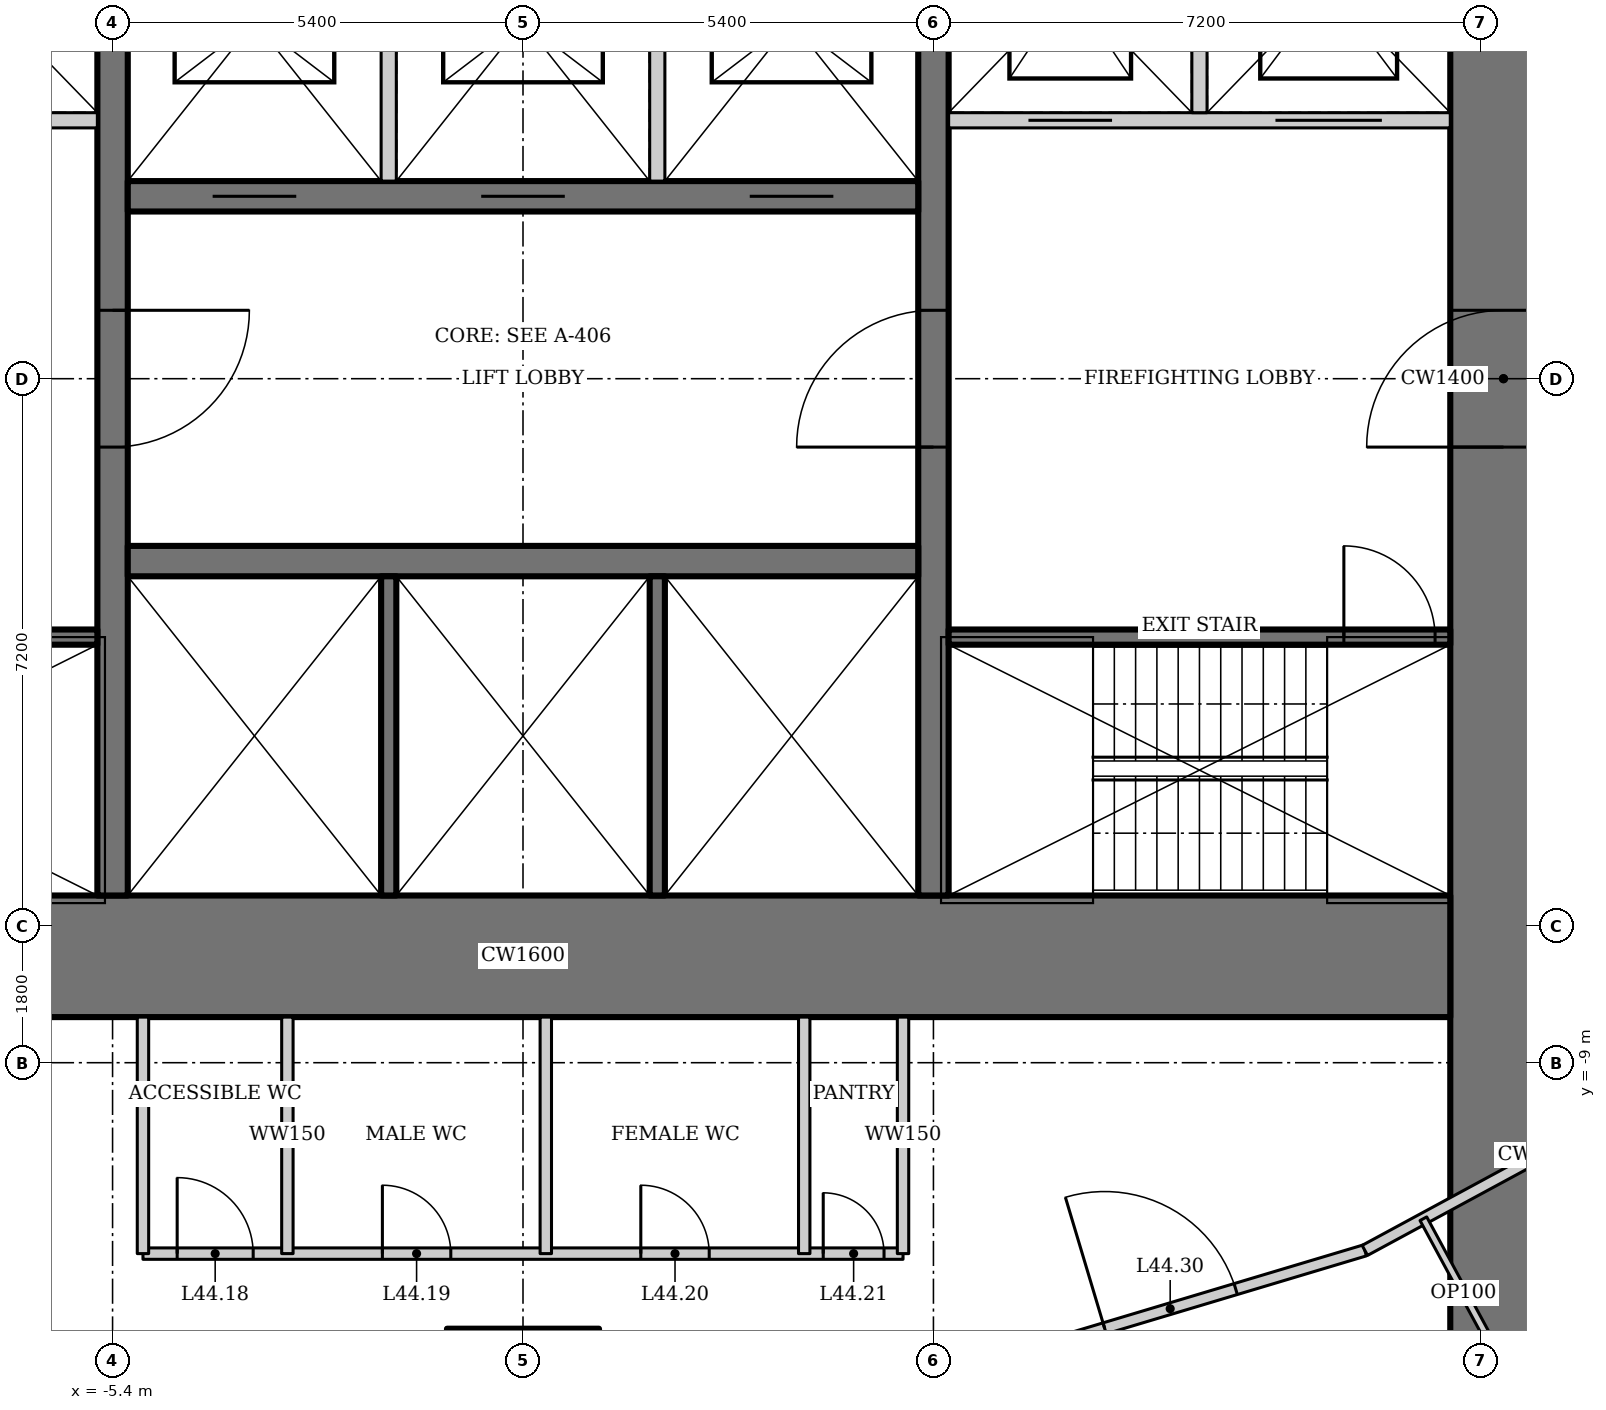
"""IFC4 building model, lengths in metres.
Left out: names, types, materials, properties, quantities, classifications, styles, units other than length and angle.
Written with IfcOpenShell. Run it as: python <this file> out.ifc"""

import sys

from ifc_helpers import new_model, si_unit, direction, frame, frame_2d, origin, origin_2d, place, context, subcontext, project, spatial, rectangle, hollow_rectangle, extrude, element, fill, save


model = new_model("IFC4")
c1 = context("Model", 3, precision=1e-05, world=origin(), true_north=direction((0.0, 1.0)))
c2 = subcontext(c1, "Body", "Model", "MODEL_VIEW")
j1 = project(units=[si_unit("LENGTHUNIT", "METRE"), si_unit("PLANEANGLEUNIT", "RADIAN")], contexts=[c1])
p1 = place(None, origin())
s1 = spatial("IfcSite", under=j1, at=p1, CompositionType="ELEMENT")
p2 = place(p1, origin())
s2 = spatial("IfcBuilding", under=s1, at=p2, CompositionType="ELEMENT")
p3 = place(p2, frame((0.0, 0.0, 188.8)))
s3 = spatial("IfcBuildingStorey", under=s2, at=p3, CompositionType="ELEMENT", Elevation=188.8)
p4 = place(p3, frame((0.0, -13.5, 0.0), z_axis=(0.0, 0.0, 1.0), x_axis=(1.0, 0.0, 0.0)))
e1 = element("IfcColumn", 1, at=p4, inside=s3, PredefinedType="COLUMN", context=c2, shape_type="SweptSolid", body=[
    extrude(hollow_rectangle(XDim=2.0, YDim=2.0, WallThickness=0.17, at=origin_2d()), origin(), (0.0, 0.0, 1.0), 4.2),
])
p5 = place(p3, frame((12.9, -13.0, 0.0), z_axis=(0.0, 0.0, 1.0), x_axis=(0.0, 1.0, 0.0)))
e2 = element("IfcWall", 2, at=p5, inside=s3, PredefinedType="SHEAR", context=c2, shape_type="SweptSolid", body=[
    extrude(rectangle(XDim=26.0, YDim=1.4, at=frame_2d((13.0, 0.0))), origin(), (0.0, 0.0, 1.0), 4.2),
])
p6 = place(p5, frame((12.1, 0.0, 0.0)))
e3 = element("IfcOpeningElement", 3, at=p6, cuts=e2, PredefinedType="OPENING", context=c2, shape_type="SweptSolid", body=[
    extrude(rectangle(XDim=1.8, YDim=2.1, at=frame_2d((0.9, 1.05))), frame((0.0, 0.71, 0.0), z_axis=(0.0, -1.0, 0.0), x_axis=(1.0, 0.0, 0.0)), (0.0, 0.0, 1.0), 1.42),
])
p7 = place(p3, frame((-12.2, -7.6, 0.0), z_axis=(0.0, 0.0, 1.0), x_axis=(1.0, 0.0, 0.0)))
e4 = element("IfcWall", 4, at=p7, inside=s3, PredefinedType="SHEAR", context=c2, shape_type="SweptSolid", body=[
    extrude(rectangle(XDim=24.4, YDim=1.6, at=frame_2d((12.2, 0.0))), origin(), (0.0, 0.0, 1.0), 4.2),
])
p8 = place(p3, frame((5.4, -6.8, 0.0), z_axis=(0.0, 0.0, 1.0), x_axis=(0.0, 1.0, 0.0)))
e5 = element("IfcWall", 5, at=p8, inside=s3, PredefinedType="SHEAR", context=c2, shape_type="SweptSolid", body=[
    extrude(rectangle(XDim=13.6, YDim=0.4, at=frame_2d((6.8, 0.0))), origin(), (0.0, 0.0, 1.0), 4.2),
])
p9 = place(p8, frame((5.9, 0.0, 0.0)))
e6 = element("IfcOpeningElement", 6, at=p9, cuts=e5, PredefinedType="OPENING", context=c2, shape_type="SweptSolid", body=[
    extrude(rectangle(XDim=1.8, YDim=2.1, at=frame_2d((0.9, 1.05))), frame((0.0, 0.21, 0.0), z_axis=(0.0, -1.0, 0.0), x_axis=(1.0, 0.0, 0.0)), (0.0, 0.0, 1.0), 0.42),
])
p10 = place(p3, frame((-5.4, 6.8, 0.0), z_axis=(0.0, 0.0, 1.0), x_axis=(0.0, -1.0, 0.0)))
e7 = element("IfcWall", 7, at=p10, inside=s3, PredefinedType="SHEAR", context=c2, shape_type="SweptSolid", body=[
    extrude(rectangle(XDim=13.6, YDim=0.4, at=frame_2d((6.8, 0.0))), origin(), (0.0, 0.0, 1.0), 4.2),
])
p11 = place(p10, frame((5.9, 0.0, 0.0)))
e8 = element("IfcOpeningElement", 8, at=p11, cuts=e7, PredefinedType="OPENING", context=c2, shape_type="SweptSolid", body=[
    extrude(rectangle(XDim=1.8, YDim=2.1, at=frame_2d((0.9, 1.05))), frame((0.0, 0.21, 0.0), z_axis=(0.0, -1.0, 0.0), x_axis=(1.0, 0.0, 0.0)), (0.0, 0.0, 1.0), 0.42),
])
p12 = place(p3, frame((-5.2, -2.4, 0.0), z_axis=(0.0, 0.0, 1.0), x_axis=(1.0, 0.0, 0.0)))
e9 = element("IfcWall", 9, at=p12, inside=s3, PredefinedType="SHEAR", context=c2, shape_type="SweptSolid", body=[
    extrude(rectangle(XDim=10.4, YDim=0.4, at=frame_2d((5.2, 0.0))), origin(), (0.0, 0.0, 1.0), 4.2),
])
for number, where, z_axis, x_axis in (
    (10, (-1.767, -2.6, 0.0), (0.0, 0.0, 1.0), (0.0, -1.0, 0.0)),
    (11, (1.767, -2.6, 0.0), (0.0, 0.0, 1.0), (0.0, -1.0, 0.0)),
):
    element("IfcWall", number, at=place(p3, frame(where, z_axis=z_axis, x_axis=x_axis)), inside=s3, PredefinedType="SOLIDWALL", context=c2, shape_type="SweptSolid", body=[
        extrude(rectangle(XDim=4.2, YDim=0.2, at=frame_2d((2.1, 0.0))), origin(), (0.0, 0.0, 1.0), 4.2),
    ])
p13 = place(p3, frame((5.2, 2.4, 0.0), z_axis=(0.0, 0.0, 1.0), x_axis=(-1.0, 0.0, 0.0)))
e12 = element("IfcWall", 12, at=p13, inside=s3, PredefinedType="SHEAR", context=c2, shape_type="SweptSolid", body=[
    extrude(rectangle(XDim=10.4, YDim=0.4, at=frame_2d((5.2, 0.0))), origin(), (0.0, 0.0, 1.0), 4.2),
])
p14 = place(p13, frame((8.183, 0.0, 0.0)))
e13 = element("IfcOpeningElement", 13, at=p14, cuts=e12, PredefinedType="OPENING", context=c2, shape_type="SweptSolid", body=[
    extrude(rectangle(XDim=1.1, YDim=2.2, at=frame_2d((0.55, 1.1))), frame((0.0, 0.21, 0.0), z_axis=(0.0, -1.0, 0.0), x_axis=(1.0, 0.0, 0.0)), (0.0, 0.0, 1.0), 0.42),
])
p15 = place(p13, frame((4.65, 0.0, 0.0)))
e14 = element("IfcOpeningElement", 14, at=p15, cuts=e12, PredefinedType="OPENING", context=c2, shape_type="SweptSolid", body=[
    extrude(rectangle(XDim=1.1, YDim=2.2, at=frame_2d((0.55, 1.1))), frame((0.0, 0.21, 0.0), z_axis=(0.0, -1.0, 0.0), x_axis=(1.0, 0.0, 0.0)), (0.0, 0.0, 1.0), 0.42),
])
p16 = place(p13, frame((1.117, 0.0, 0.0)))
e15 = element("IfcOpeningElement", 15, at=p16, cuts=e12, PredefinedType="OPENING", context=c2, shape_type="SweptSolid", body=[
    extrude(rectangle(XDim=1.1, YDim=2.2, at=frame_2d((0.55, 1.1))), frame((0.0, 0.21, 0.0), z_axis=(0.0, -1.0, 0.0), x_axis=(1.0, 0.0, 0.0)), (0.0, 0.0, 1.0), 0.42),
])
for number, where, z_axis, x_axis in (
    (16, (-1.767, 2.6, 0.0), (0.0, 0.0, 1.0), (0.0, 1.0, 0.0)),
    (17, (1.767, 2.6, 0.0), (0.0, 0.0, 1.0), (0.0, 1.0, 0.0)),
):
    element("IfcWall", number, at=place(p3, frame(where, z_axis=z_axis, x_axis=x_axis)), inside=s3, PredefinedType="SOLIDWALL", context=c2, shape_type="SweptSolid", body=[
        extrude(rectangle(XDim=4.2, YDim=0.2, at=frame_2d((2.1, 0.0))), origin(), (0.0, 0.0, 1.0), 4.2),
    ])
p17 = place(p3, frame((5.6, -3.4, 0.0), z_axis=(0.0, 0.0, 1.0), x_axis=(1.0, 0.0, 0.0)))
e18 = element("IfcWall", 18, at=p17, inside=s3, PredefinedType="SHEAR", context=c2, shape_type="SweptSolid", body=[
    extrude(rectangle(XDim=6.6, YDim=0.2, at=frame_2d((3.3, 0.0))), origin(), (0.0, 0.0, 1.0), 4.2),
])
p18 = place(p17, frame((5.2, 0.0, 0.0)))
e19 = element("IfcOpeningElement", 19, at=p18, cuts=e18, PredefinedType="OPENING", context=c2, shape_type="SweptSolid", body=[
    extrude(rectangle(XDim=1.2, YDim=2.1, at=frame_2d((0.6, 1.05))), frame((0.0, 0.11, 0.0), z_axis=(0.0, -1.0, 0.0), x_axis=(1.0, 0.0, 0.0)), (0.0, 0.0, 1.0), 0.22),
])
p19 = place(p3, frame((12.2, 3.4, 0.0), z_axis=(0.0, 0.0, 1.0), x_axis=(-1.0, 0.0, 0.0)))
e20 = element("IfcWall", 20, at=p19, inside=s3, PredefinedType="SOLIDWALL", context=c2, shape_type="SweptSolid", body=[
    extrude(rectangle(XDim=6.6, YDim=0.2, at=frame_2d((3.3, 0.0))), origin(), (0.0, 0.0, 1.0), 4.2),
])
p20 = place(p19, frame((4.45, 0.0, 0.0)))
e21 = element("IfcOpeningElement", 21, at=p20, cuts=e20, PredefinedType="OPENING", context=c2, shape_type="SweptSolid", body=[
    extrude(rectangle(XDim=1.1, YDim=2.2, at=frame_2d((0.55, 1.1))), frame((0.0, 0.11, 0.0), z_axis=(0.0, -1.0, 0.0), x_axis=(1.0, 0.0, 0.0)), (0.0, 0.0, 1.0), 0.22),
])
p21 = place(p19, frame((0.9, 0.0, 0.0)))
e22 = element("IfcOpeningElement", 22, at=p21, cuts=e20, PredefinedType="OPENING", context=c2, shape_type="SweptSolid", body=[
    extrude(rectangle(XDim=1.4, YDim=2.2, at=frame_2d((0.7, 1.1))), frame((0.0, 0.11, 0.0), z_axis=(0.0, -1.0, 0.0), x_axis=(1.0, 0.0, 0.0)), (0.0, 0.0, 1.0), 0.22),
])
p22 = place(p3, frame((8.9, 3.5, 0.0), z_axis=(0.0, 0.0, 1.0), x_axis=(0.0, 1.0, 0.0)))
e23 = element("IfcWall", 23, at=p22, inside=s3, PredefinedType="SOLIDWALL", context=c2, shape_type="SweptSolid", body=[
    extrude(rectangle(XDim=3.3, YDim=0.2, at=frame_2d((1.65, 0.0))), origin(), (0.0, 0.0, 1.0), 4.2),
])
p23 = place(p3, frame((-5.6, -3.4, 0.0), z_axis=(0.0, 0.0, 1.0), x_axis=(-1.0, 0.0, 0.0)))
e24 = element("IfcWall", 24, at=p23, inside=s3, PredefinedType="SHEAR", context=c2, shape_type="SweptSolid", body=[
    extrude(rectangle(XDim=6.6, YDim=0.2, at=frame_2d((3.3, 0.0))), origin(), (0.0, 0.0, 1.0), 4.2),
])
p24 = place(p23, frame((5.2, 0.0, 0.0)))
e25 = element("IfcOpeningElement", 25, at=p24, cuts=e24, PredefinedType="OPENING", context=c2, shape_type="SweptSolid", body=[
    extrude(rectangle(XDim=1.2, YDim=2.1, at=frame_2d((0.6, 1.05))), frame((0.0, 0.11, 0.0), z_axis=(0.0, -1.0, 0.0), x_axis=(1.0, 0.0, 0.0)), (0.0, 0.0, 1.0), 0.22),
])
p25 = place(p3, frame((-12.2, 3.4, 0.0), z_axis=(0.0, 0.0, 1.0), x_axis=(1.0, 0.0, 0.0)))
e26 = element("IfcWall", 26, at=p25, inside=s3, PredefinedType="SOLIDWALL", context=c2, shape_type="SweptSolid", body=[
    extrude(rectangle(XDim=6.6, YDim=0.2, at=frame_2d((3.3, 0.0))), origin(), (0.0, 0.0, 1.0), 4.2),
])
p26 = place(p25, frame((1.05, 0.0, 0.0)))
e27 = element("IfcOpeningElement", 27, at=p26, cuts=e26, PredefinedType="OPENING", context=c2, shape_type="SweptSolid", body=[
    extrude(rectangle(XDim=1.1, YDim=2.2, at=frame_2d((0.55, 1.1))), frame((0.0, 0.11, 0.0), z_axis=(0.0, -1.0, 0.0), x_axis=(1.0, 0.0, 0.0)), (0.0, 0.0, 1.0), 0.22),
])
p27 = place(p25, frame((4.3, 0.0, 0.0)))
e28 = element("IfcOpeningElement", 28, at=p27, cuts=e26, PredefinedType="OPENING", context=c2, shape_type="SweptSolid", body=[
    extrude(rectangle(XDim=1.4, YDim=2.2, at=frame_2d((0.7, 1.1))), frame((0.0, 0.11, 0.0), z_axis=(0.0, -1.0, 0.0), x_axis=(1.0, 0.0, 0.0)), (0.0, 0.0, 1.0), 0.22),
])
p28 = place(p3, frame((6.537, -12.829, 0.0), z_axis=(0.0, 0.0, 1.0), x_axis=(0.957933992798, 0.286988615527, 0.0)))
e29 = element("IfcWall", 29, at=p28, inside=s3, PredefinedType="PARTITIONING", context=c2, shape_type="SweptSolid", body=[
    extrude(rectangle(XDim=4.738, YDim=0.15, at=frame_2d((2.369, 0.0))), origin(), (0.0, 0.0, 1.0), 4.0),
])
p29 = place(p28, frame((1.165, 0.0, 0.0)))
e30 = element("IfcOpeningElement", 30, at=p29, cuts=e29, PredefinedType="OPENING", context=c2, shape_type="SweptSolid", body=[
    extrude(rectangle(XDim=1.8, YDim=2.1, at=frame_2d((0.9, 1.05))), frame((0.0, 0.085, 0.0), z_axis=(0.0, -1.0, 0.0), x_axis=(1.0, 0.0, 0.0)), (0.0, 0.0, 1.0), 0.17),
])
p30 = place(p3, frame((11.076, -11.469, 0.0), z_axis=(0.0, 0.0, 1.0), x_axis=(0.879436285334, 0.476016617397, 0.0)))
e31 = element("IfcWall", 31, at=p30, inside=s3, PredefinedType="PARTITIONING", context=c2, shape_type="SweptSolid", body=[
    extrude(rectangle(XDim=5.253, YDim=0.15, at=frame_2d((2.626, 0.0))), origin(), (0.0, 0.0, 1.0), 4.0),
])
p31 = place(p3, frame((-5.0, -11.512, 0.0), z_axis=(0.0, 0.0, 1.0), x_axis=(1.0, 0.0, 0.0)))
e32 = element("IfcWall", 32, at=p31, inside=s3, PredefinedType="SOLIDWALL", context=c2, shape_type="SweptSolid", body=[
    extrude(rectangle(XDim=10.0, YDim=0.15, at=frame_2d((5.0, 0.0))), origin(), (0.0, 0.0, 1.0), 4.0),
])
p32 = place(p31, frame((0.45, 0.0, 0.0)))
e33 = element("IfcOpeningElement", 33, at=p32, cuts=e32, PredefinedType="OPENING", context=c2, shape_type="SweptSolid", body=[
    extrude(rectangle(XDim=1.0, YDim=2.1, at=frame_2d((0.5, 1.05))), frame((0.0, 0.085, 0.0), z_axis=(0.0, -1.0, 0.0), x_axis=(1.0, 0.0, 0.0)), (0.0, 0.0, 1.0), 0.17),
])
p33 = place(p31, frame((3.15, 0.0, 0.0)))
e34 = element("IfcOpeningElement", 34, at=p33, cuts=e32, PredefinedType="OPENING", context=c2, shape_type="SweptSolid", body=[
    extrude(rectangle(XDim=0.9, YDim=2.1, at=frame_2d((0.45, 1.05))), frame((0.0, 0.085, 0.0), z_axis=(0.0, -1.0, 0.0), x_axis=(1.0, 0.0, 0.0)), (0.0, 0.0, 1.0), 0.17),
])
p34 = place(p31, frame((6.55, 0.0, 0.0)))
e35 = element("IfcOpeningElement", 35, at=p34, cuts=e32, PredefinedType="OPENING", context=c2, shape_type="SweptSolid", body=[
    extrude(rectangle(XDim=0.9, YDim=2.1, at=frame_2d((0.45, 1.05))), frame((0.0, 0.085, 0.0), z_axis=(0.0, -1.0, 0.0), x_axis=(1.0, 0.0, 0.0)), (0.0, 0.0, 1.0), 0.17),
])
p35 = place(p31, frame((8.95, 0.0, 0.0)))
e36 = element("IfcOpeningElement", 36, at=p35, cuts=e32, PredefinedType="OPENING", context=c2, shape_type="SweptSolid", body=[
    extrude(rectangle(XDim=0.8, YDim=2.1, at=frame_2d((0.4, 1.05))), frame((0.0, 0.085, 0.0), z_axis=(0.0, -1.0, 0.0), x_axis=(1.0, 0.0, 0.0)), (0.0, 0.0, 1.0), 0.17),
])
for number, where, z_axis, x_axis in (
    (37, (-5.0, -8.4, 0.0), (0.0, 0.0, 1.0), (0.0, -1.0, 0.0)),
    (38, (5.0, -8.4, 0.0), (0.0, 0.0, 1.0), (0.0, -1.0, 0.0)),
    (39, (-3.1, -8.4, 0.0), (0.0, 0.0, 1.0), (0.0, -1.0, 0.0)),
):
    element("IfcWall", number, at=place(p3, frame(where, z_axis=z_axis, x_axis=x_axis)), inside=s3, PredefinedType="SOLIDWALL", context=c2, shape_type="SweptSolid", body=[
        extrude(rectangle(XDim=3.112, YDim=0.15, at=frame_2d((1.556, 0.0))), origin(), (0.0, 0.0, 1.0), 4.0),
    ])
p36 = place(p3, frame((0.3, -8.4, 0.0), z_axis=(0.0, 0.0, 1.0), x_axis=(0.0, -1.0, 0.0)))
e40 = element("IfcWall", 40, at=p36, inside=s3, PredefinedType="SOLIDWALL", context=c2, shape_type="SweptSolid", body=[
    extrude(rectangle(XDim=3.112, YDim=0.15, at=frame_2d((1.556, 0.0))), origin(), (0.0, 0.0, 1.0), 2.8),
])
p37 = place(p3, frame((3.7, -8.4, 0.0), z_axis=(0.0, 0.0, 1.0), x_axis=(0.0, -1.0, 0.0)))
e41 = element("IfcWall", 41, at=p37, inside=s3, PredefinedType="SOLIDWALL", context=c2, shape_type="SweptSolid", body=[
    extrude(rectangle(XDim=3.112, YDim=0.15, at=frame_2d((1.556, 0.0))), origin(), (0.0, 0.0, 1.0), 4.0),
])
p38 = place(p3, frame((12.9, -13.0, 0.0), z_axis=(0.0, 0.0, 1.0), x_axis=(-0.475998959765, 0.879445842734, 0.0)))
e42 = element("IfcWall", 42, at=p38, inside=s3, PredefinedType="PARTITIONING", context=c2, shape_type="SweptSolid", body=[
    extrude(rectangle(XDim=2.214, YDim=0.1, at=frame_2d((1.107, 0.0))), origin(), (0.0, 0.0, 1.0), 4.0),
])
p39 = place(p9, origin())
e43 = element("IfcDoor", 43, at=p39, inside=s3, OperationType="DOUBLE_DOOR_DOUBLE_SWING", PredefinedType="DOOR", context=c2, shape_type="SweptSolid", body=[
    extrude(rectangle(XDim=1.8, YDim=2.1, at=frame_2d((0.9, 1.05))), frame((0.0, 0.025, 0.0), z_axis=(0.0, -1.0, 0.0), x_axis=(1.0, 0.0, 0.0)), (0.0, 0.0, 1.0), 0.05),
])
fill(e6, e43)
p40 = place(p11, origin())
e44 = element("IfcDoor", 44, at=p40, inside=s3, OperationType="DOUBLE_DOOR_DOUBLE_SWING", PredefinedType="DOOR", context=c2, shape_type="SweptSolid", body=[
    extrude(rectangle(XDim=1.8, YDim=2.1, at=frame_2d((0.9, 1.05))), frame((0.0, 0.025, 0.0), z_axis=(0.0, -1.0, 0.0), x_axis=(1.0, 0.0, 0.0)), (0.0, 0.0, 1.0), 0.05),
])
fill(e8, e44)
p41 = place(p18, origin())
e45 = element("IfcDoor", 45, at=p41, inside=s3, OperationType="SINGLE_SWING_RIGHT", PredefinedType="DOOR", context=c2, shape_type="SweptSolid", body=[
    extrude(rectangle(XDim=1.2, YDim=2.1, at=frame_2d((0.6, 1.05))), frame((0.0, 0.025, 0.0), z_axis=(0.0, -1.0, 0.0), x_axis=(1.0, 0.0, 0.0)), (0.0, 0.0, 1.0), 0.05),
])
fill(e19, e45)
p42 = place(p6, origin())
e46 = element("IfcDoor", 46, at=p42, inside=s3, OperationType="DOUBLE_DOOR_DOUBLE_SWING", PredefinedType="DOOR", context=c2, shape_type="SweptSolid", body=[
    extrude(rectangle(XDim=1.8, YDim=2.1, at=frame_2d((0.9, 1.05))), frame((0.0, 0.025, 0.0), z_axis=(0.0, -1.0, 0.0), x_axis=(1.0, 0.0, 0.0)), (0.0, 0.0, 1.0), 0.05),
])
fill(e3, e46)
p43 = place(p14, origin())
e47 = element("IfcDoor", 47, at=p43, inside=s3, OperationType="DOUBLE_DOOR_SLIDING", PredefinedType="DOOR", context=c2, shape_type="SweptSolid", body=[
    extrude(rectangle(XDim=1.1, YDim=2.2, at=frame_2d((0.55, 1.1))), frame((0.0, 0.025, 0.0), z_axis=(0.0, -1.0, 0.0), x_axis=(1.0, 0.0, 0.0)), (0.0, 0.0, 1.0), 0.05),
])
fill(e13, e47)
p44 = place(p15, origin())
e48 = element("IfcDoor", 48, at=p44, inside=s3, OperationType="DOUBLE_DOOR_SLIDING", PredefinedType="DOOR", context=c2, shape_type="SweptSolid", body=[
    extrude(rectangle(XDim=1.1, YDim=2.2, at=frame_2d((0.55, 1.1))), frame((0.0, 0.025, 0.0), z_axis=(0.0, -1.0, 0.0), x_axis=(1.0, 0.0, 0.0)), (0.0, 0.0, 1.0), 0.05),
])
fill(e14, e48)
p45 = place(p16, origin())
e49 = element("IfcDoor", 49, at=p45, inside=s3, OperationType="DOUBLE_DOOR_SLIDING", PredefinedType="DOOR", context=c2, shape_type="SweptSolid", body=[
    extrude(rectangle(XDim=1.1, YDim=2.2, at=frame_2d((0.55, 1.1))), frame((0.0, 0.025, 0.0), z_axis=(0.0, -1.0, 0.0), x_axis=(1.0, 0.0, 0.0)), (0.0, 0.0, 1.0), 0.05),
])
fill(e15, e49)
p46 = place(p20, origin())
e50 = element("IfcDoor", 50, at=p46, inside=s3, OperationType="DOUBLE_DOOR_SLIDING", PredefinedType="DOOR", context=c2, shape_type="SweptSolid", body=[
    extrude(rectangle(XDim=1.1, YDim=2.2, at=frame_2d((0.55, 1.1))), frame((0.0, 0.025, 0.0), z_axis=(0.0, -1.0, 0.0), x_axis=(1.0, 0.0, 0.0)), (0.0, 0.0, 1.0), 0.05),
])
fill(e21, e50)
p47 = place(p21, origin())
e51 = element("IfcDoor", 51, at=p47, inside=s3, OperationType="DOUBLE_DOOR_SLIDING", PredefinedType="DOOR", context=c2, shape_type="SweptSolid", body=[
    extrude(rectangle(XDim=1.4, YDim=2.2, at=frame_2d((0.7, 1.1))), frame((0.0, 0.025, 0.0), z_axis=(0.0, -1.0, 0.0), x_axis=(1.0, 0.0, 0.0)), (0.0, 0.0, 1.0), 0.05),
])
fill(e22, e51)
p48 = place(p32, origin())
e52 = element("IfcDoor", 52, at=p48, inside=s3, OperationType="SINGLE_SWING_LEFT", PredefinedType="DOOR", context=c2, shape_type="SweptSolid", body=[
    extrude(rectangle(XDim=1.0, YDim=2.1, at=frame_2d((0.5, 1.05))), frame((0.0, 0.025, 0.0), z_axis=(0.0, -1.0, 0.0), x_axis=(1.0, 0.0, 0.0)), (0.0, 0.0, 1.0), 0.05),
])
fill(e33, e52)
p49 = place(p33, origin())
e53 = element("IfcDoor", 53, at=p49, inside=s3, OperationType="SINGLE_SWING_LEFT", PredefinedType="DOOR", context=c2, shape_type="SweptSolid", body=[
    extrude(rectangle(XDim=0.9, YDim=2.1, at=frame_2d((0.45, 1.05))), frame((0.0, 0.025, 0.0), z_axis=(0.0, -1.0, 0.0), x_axis=(1.0, 0.0, 0.0)), (0.0, 0.0, 1.0), 0.05),
])
fill(e34, e53)
p50 = place(p34, origin())
e54 = element("IfcDoor", 54, at=p50, inside=s3, OperationType="SINGLE_SWING_LEFT", PredefinedType="DOOR", context=c2, shape_type="SweptSolid", body=[
    extrude(rectangle(XDim=0.9, YDim=2.1, at=frame_2d((0.45, 1.05))), frame((0.0, 0.025, 0.0), z_axis=(0.0, -1.0, 0.0), x_axis=(1.0, 0.0, 0.0)), (0.0, 0.0, 1.0), 0.05),
])
fill(e35, e54)
p51 = place(p35, origin())
e55 = element("IfcDoor", 55, at=p51, inside=s3, OperationType="SINGLE_SWING_LEFT", PredefinedType="DOOR", context=c2, shape_type="SweptSolid", body=[
    extrude(rectangle(XDim=0.8, YDim=2.1, at=frame_2d((0.4, 1.05))), frame((0.0, 0.025, 0.0), z_axis=(0.0, -1.0, 0.0), x_axis=(1.0, 0.0, 0.0)), (0.0, 0.0, 1.0), 0.05),
])
fill(e36, e55)
p52 = place(p29, origin())
e56 = element("IfcDoor", 56, at=p52, inside=s3, OperationType="DOUBLE_DOOR_DOUBLE_SWING", PredefinedType="DOOR", context=c2, shape_type="SweptSolid", body=[
    extrude(rectangle(XDim=1.8, YDim=2.1, at=frame_2d((0.9, 1.05))), frame((0.0, 0.025, 0.0), z_axis=(0.0, -1.0, 0.0), x_axis=(1.0, 0.0, 0.0)), (0.0, 0.0, 1.0), 0.05),
])
fill(e30, e56)
save(model, sys.argv[1])
